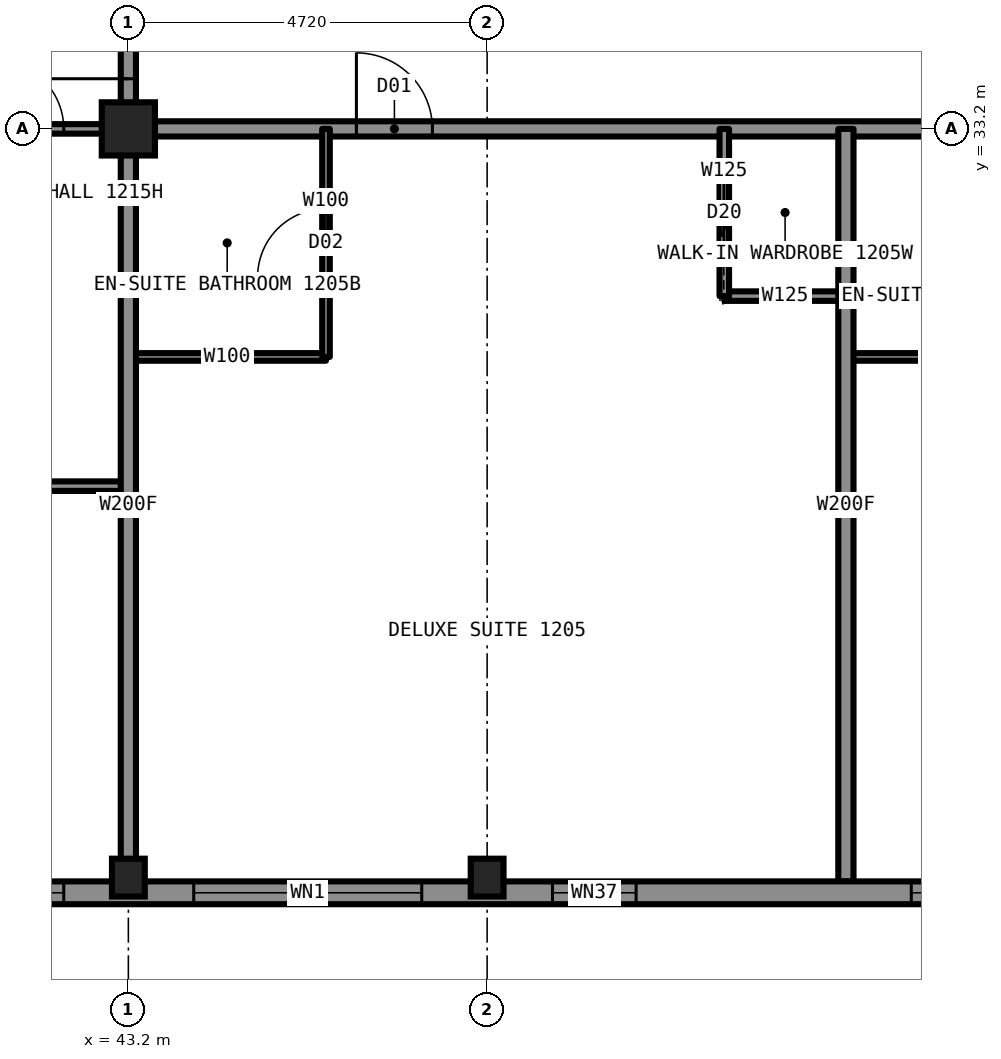
"""IFC4 building model, lengths in metres.
Left out: names, types, materials, properties, quantities, classifications, styles, units other than length and angle.
Written with IfcOpenShell. Run it as: python <this file> out.ifc"""

import sys

from ifc_helpers import new_model, si_unit, direction, frame, frame_2d, origin, origin_2d, place, context, subcontext, project, spatial, rectangle, hollow_rectangle, i_section, extrude, element, fill, save


model = new_model("IFC4")
c1 = context("Model", 3, precision=1e-05, world=origin(), true_north=direction((0.0, 1.0)))
c2 = subcontext(c1, "Body", "Model", "MODEL_VIEW")
j1 = project(units=[si_unit("LENGTHUNIT", "METRE"), si_unit("PLANEANGLEUNIT", "RADIAN")], contexts=[c1])
p1 = place(None, origin())
s1 = spatial("IfcSite", under=j1, at=p1, CompositionType="ELEMENT")
p2 = place(p1, origin())
s2 = spatial("IfcBuilding", under=s1, at=p2, CompositionType="ELEMENT")
p3 = place(p2, frame((0.0, 0.0, 49.5)))
s3 = spatial("IfcBuildingStorey", under=s2, at=p3, CompositionType="ELEMENT", Elevation=49.5)
for number, where, z_axis, x_axis in (
    (1, (43.2, 23.35, 0.0), (0.0, 0.0, 1.0), (1.0, 0.0, 0.0)),
    (2, (47.92, 23.35, 0.0), (0.0, 0.0, 1.0), (1.0, 0.0, 0.0)),
):
    element("IfcColumn", number, at=place(p3, frame(where, z_axis=z_axis, x_axis=x_axis)), inside=s3, PredefinedType="COLUMN", context=c2, shape_type="SweptSolid", body=[
        extrude(i_section(OverallWidth=0.432, OverallDepth=0.498, WebThickness=0.056, FlangeThickness=0.089, at=origin_2d()), origin(), (0.0, 0.0, 1.0), 3.5),
    ])
p4 = place(p3, frame((43.2, 33.2, 0.0), z_axis=(0.0, 0.0, 1.0), x_axis=(1.0, 0.0, 0.0)))
e3 = element("IfcColumn", 3, at=p4, inside=s3, PredefinedType="COLUMN", context=c2, shape_type="SweptSolid", body=[
    extrude(hollow_rectangle(XDim=0.7, YDim=0.7, WallThickness=0.06, at=origin_2d()), origin(), (0.0, 0.0, 1.0), 3.5),
])
p5 = place(p3, frame((43.2, 33.2, 0.0), z_axis=(0.0, 0.0, 1.0), x_axis=(1.0, 0.0, 0.0)))
e4 = element("IfcWall", 4, at=p5, inside=s3, PredefinedType="PARTITIONING", context=c2, shape_type="SweptSolid", body=[
    extrude(rectangle(XDim=23.6, YDim=0.2, at=frame_2d((11.8, 0.0))), origin(), (0.0, 0.0, 1.0), 3.33),
])
p6 = place(p5, frame((3.0, 0.0, 0.0)))
e5 = element("IfcOpeningElement", 5, at=p6, cuts=e4, PredefinedType="OPENING", context=c2, shape_type="SweptSolid", body=[
    extrude(rectangle(XDim=1.0, YDim=2.2, at=frame_2d((0.5, 1.1))), frame((0.0, 0.11, 0.0), z_axis=(0.0, -1.0, 0.0), x_axis=(1.0, 0.0, 0.0)), (0.0, 0.0, 1.0), 0.22),
])
p7 = place(p5, frame((12.44, 0.0, 0.0)))
e6 = element("IfcOpeningElement", 6, at=p7, cuts=e4, PredefinedType="OPENING", context=c2, shape_type="SweptSolid", body=[
    extrude(rectangle(XDim=1.0, YDim=2.2, at=frame_2d((0.5, 1.1))), frame((0.0, 0.11, 0.0), z_axis=(0.0, -1.0, 0.0), x_axis=(1.0, 0.0, 0.0)), (0.0, 0.0, 1.0), 0.22),
])
p8 = place(p5, frame((19.28, 0.0, 0.0)))
e7 = element("IfcOpeningElement", 7, at=p8, cuts=e4, PredefinedType="OPENING", context=c2, shape_type="SweptSolid", body=[
    extrude(rectangle(XDim=1.0, YDim=2.2, at=frame_2d((0.5, 1.1))), frame((0.0, 0.11, 0.0), z_axis=(0.0, -1.0, 0.0), x_axis=(1.0, 0.0, 0.0)), (0.0, 0.0, 1.0), 0.22),
])
p9 = place(p3, frame((33.3, 33.2, 0.0), z_axis=(0.0, 0.0, 1.0), x_axis=(1.0, 0.0, 0.0)))
e8 = element("IfcWall", 8, at=p9, inside=s3, PredefinedType="PARTITIONING", context=c2, shape_type="SweptSolid", body=[
    extrude(rectangle(XDim=9.9, YDim=0.125, at=frame_2d((4.95, 0.0))), origin(), (0.0, 0.0, 1.0), 2.573),
])
p10 = place(p9, frame((8.15, 0.0, 0.0)))
e9 = element("IfcOpeningElement", 9, at=p10, cuts=e8, PredefinedType="OPENING", context=c2, shape_type="SweptSolid", body=[
    extrude(rectangle(XDim=0.9, YDim=2.2, at=frame_2d((0.45, 1.1))), frame((0.0, 0.073, 0.0), z_axis=(0.0, -1.0, 0.0), x_axis=(1.0, 0.0, 0.0)), (0.0, 0.0, 1.0), 0.145),
])
p11 = place(p3, frame((51.04, 31.0, 0.0), z_axis=(0.0, 0.0, 1.0), x_axis=(1.0, 0.0, 0.0)))
e10 = element("IfcWall", 10, at=p11, inside=s3, PredefinedType="PARTITIONING", context=c2, shape_type="SweptSolid", body=[
    extrude(rectangle(XDim=1.6, YDim=0.125, at=frame_2d((0.8, 0.0))), origin(), (0.0, 0.0, 1.0), 3.33),
])
for number, where, z_axis, x_axis in (
    (11, (43.2, 30.2, 0.0), (0.0, 0.0, 1.0), (1.0, 0.0, 0.0)),
    (12, (52.64, 30.2, 0.0), (0.0, 0.0, 1.0), (1.0, 0.0, 0.0)),
):
    element("IfcWall", number, at=place(p3, frame(where, z_axis=z_axis, x_axis=x_axis)), inside=s3, PredefinedType="PARTITIONING", context=c2, shape_type="SweptSolid", body=[
        extrude(rectangle(XDim=2.6, YDim=0.1, at=frame_2d((1.3, 0.0))), origin(), (0.0, 0.0, 1.0), 3.33),
    ])
p12 = place(p3, frame((33.306, 28.5, 0.0), z_axis=(0.0, 0.0, 1.0), x_axis=(1.0, 0.0, 0.0)))
e13 = element("IfcWall", 13, at=p12, inside=s3, PredefinedType="PARTITIONING", context=c2, shape_type="SweptSolid", body=[
    extrude(rectangle(XDim=9.894, YDim=0.125, at=frame_2d((4.947, 0.0))), origin(), (0.0, 0.0, 1.0), 3.33),
])
p13 = place(p12, frame((7.244, 0.0, 0.0)))
e14 = element("IfcOpeningElement", 14, at=p13, cuts=e13, PredefinedType="OPENING", context=c2, shape_type="SweptSolid", body=[
    extrude(rectangle(XDim=0.9, YDim=2.2, at=frame_2d((0.45, 1.1))), frame((0.0, 0.073, 0.0), z_axis=(0.0, -1.0, 0.0), x_axis=(1.0, 0.0, 0.0)), (0.0, 0.0, 1.0), 0.145),
])
p14 = place(p3, frame((43.2, 33.2, 0.0), z_axis=(0.0, 0.0, 1.0), x_axis=(0.0, 1.0, 0.0)))
e15 = element("IfcWall", 15, at=p14, inside=s3, PredefinedType="PARTITIONING", context=c2, shape_type="SweptSolid", body=[
    extrude(rectangle(XDim=4.72, YDim=0.2, at=frame_2d((2.36, 0.0))), origin(), (0.0, 0.0, 1.0), 3.33),
])
p15 = place(p14, frame((0.66, 0.0, 0.0)))
e16 = element("IfcOpeningElement", 16, at=p15, cuts=e15, PredefinedType="OPENING", context=c2, shape_type="SweptSolid", body=[
    extrude(rectangle(XDim=1.1, YDim=2.2, at=frame_2d((0.55, 1.1))), frame((0.0, 0.11, 0.0), z_axis=(0.0, -1.0, 0.0), x_axis=(1.0, 0.0, 0.0)), (0.0, 0.0, 1.0), 0.22),
])
p16 = place(p3, frame((43.2, 23.3, 0.0), z_axis=(0.0, 0.0, 1.0), x_axis=(0.0, 1.0, 0.0)))
e17 = element("IfcWall", 17, at=p16, inside=s3, PredefinedType="PARTITIONING", context=c2, shape_type="SweptSolid", body=[
    extrude(rectangle(XDim=9.9, YDim=0.2, at=frame_2d((4.95, 0.0))), origin(), (0.0, 0.0, 1.0), 2.573),
])
p17 = place(p3, frame((52.64, 23.3, 0.0), z_axis=(0.0, 0.0, 1.0), x_axis=(0.0, 1.0, 0.0)))
e18 = element("IfcWall", 18, at=p17, inside=s3, PredefinedType="PARTITIONING", context=c2, shape_type="SweptSolid", body=[
    extrude(rectangle(XDim=9.9, YDim=0.2, at=frame_2d((4.95, 0.0))), origin(), (0.0, 0.0, 1.0), 3.33),
])
p18 = place(p3, frame((51.04, 31.0, 0.0), z_axis=(0.0, 0.0, 1.0), x_axis=(0.0, 1.0, 0.0)))
e19 = element("IfcWall", 19, at=p18, inside=s3, PredefinedType="PARTITIONING", context=c2, shape_type="SweptSolid", body=[
    extrude(rectangle(XDim=2.2, YDim=0.125, at=frame_2d((1.1, 0.0))), origin(), (0.0, 0.0, 1.0), 3.33),
])
p19 = place(p18, frame((0.7, 0.0, 0.0)))
e20 = element("IfcOpeningElement", 20, at=p19, cuts=e19, PredefinedType="OPENING", context=c2, shape_type="SweptSolid", body=[
    extrude(rectangle(XDim=0.8, YDim=2.1, at=frame_2d((0.4, 1.05))), frame((0.0, 0.073, 0.0), z_axis=(0.0, -1.0, 0.0), x_axis=(1.0, 0.0, 0.0)), (0.0, 0.0, 1.0), 0.145),
])
p20 = place(p3, frame((45.8, 30.2, 0.0), z_axis=(0.0, 0.0, 1.0), x_axis=(0.0, 1.0, 0.0)))
e21 = element("IfcWall", 21, at=p20, inside=s3, PredefinedType="PARTITIONING", context=c2, shape_type="SweptSolid", body=[
    extrude(rectangle(XDim=3.0, YDim=0.1, at=frame_2d((1.5, 0.0))), origin(), (0.0, 0.0, 1.0), 3.33),
])
p21 = place(p20, frame((1.05, 0.0, 0.0)))
e22 = element("IfcOpeningElement", 22, at=p21, cuts=e21, PredefinedType="OPENING", context=c2, shape_type="SweptSolid", body=[
    extrude(rectangle(XDim=0.9, YDim=2.1, at=frame_2d((0.45, 1.05))), frame((0.0, 0.06, 0.0), z_axis=(0.0, -1.0, 0.0), x_axis=(1.0, 0.0, 0.0)), (0.0, 0.0, 1.0), 0.12),
])
p22 = place(p3, frame((38.5, 23.15, 0.0), z_axis=(0.0, 0.0, 1.0), x_axis=(1.0, 0.0, 0.0)))
e23 = element("IfcWall", 23, at=p22, inside=s3, PredefinedType="SOLIDWALL", context=c2, shape_type="SweptSolid", body=[
    extrude(rectangle(XDim=33.0, YDim=0.3, at=frame_2d((16.5, 0.0))), origin(), (0.0, 0.0, 1.0), 2.83),
])
p23 = place(p22, frame((0.85, 0.0, 0.5)))
e24 = element("IfcOpeningElement", 24, at=p23, cuts=e23, PredefinedType="OPENING", context=c2, shape_type="SweptSolid", body=[
    extrude(rectangle(XDim=3.0, YDim=2.0, at=frame_2d((1.5, 1.0))), frame((0.0, 0.16, 0.0), z_axis=(0.0, -1.0, 0.0), x_axis=(1.0, 0.0, 0.0)), (0.0, 0.0, 1.0), 0.32),
])
p24 = place(p22, frame((5.56, 0.0, 0.5)))
e25 = element("IfcOpeningElement", 25, at=p24, cuts=e23, PredefinedType="OPENING", context=c2, shape_type="SweptSolid", body=[
    extrude(rectangle(XDim=3.0, YDim=2.0, at=frame_2d((1.5, 1.0))), frame((0.0, 0.16, 0.0), z_axis=(0.0, -1.0, 0.0), x_axis=(1.0, 0.0, 0.0)), (0.0, 0.0, 1.0), 0.32),
])
p25 = place(p22, frame((10.28, 0.0, 1.1)))
e26 = element("IfcOpeningElement", 26, at=p25, cuts=e23, PredefinedType="OPENING", context=c2, shape_type="SweptSolid", body=[
    extrude(rectangle(XDim=1.1, YDim=1.4, at=frame_2d((0.55, 0.7))), frame((0.0, 0.16, 0.0), z_axis=(0.0, -1.0, 0.0), x_axis=(1.0, 0.0, 0.0)), (0.0, 0.0, 1.0), 0.32),
])
p26 = place(p22, frame((15.0, 0.0, 0.5)))
e27 = element("IfcOpeningElement", 27, at=p26, cuts=e23, PredefinedType="OPENING", context=c2, shape_type="SweptSolid", body=[
    extrude(rectangle(XDim=3.0, YDim=2.0, at=frame_2d((1.5, 1.0))), frame((0.0, 0.16, 0.0), z_axis=(0.0, -1.0, 0.0), x_axis=(1.0, 0.0, 0.0)), (0.0, 0.0, 1.0), 0.32),
])
p27 = place(p22, frame((21.62, 0.0, 1.1)))
e28 = element("IfcOpeningElement", 28, at=p27, cuts=e23, PredefinedType="OPENING", context=c2, shape_type="SweptSolid", body=[
    extrude(rectangle(XDim=1.1, YDim=1.4, at=frame_2d((0.55, 0.7))), frame((0.0, 0.16, 0.0), z_axis=(0.0, -1.0, 0.0), x_axis=(1.0, 0.0, 0.0)), (0.0, 0.0, 1.0), 0.32),
])
p28 = place(p22, frame((24.44, 0.0, 0.5)))
e29 = element("IfcOpeningElement", 29, at=p28, cuts=e23, PredefinedType="OPENING", context=c2, shape_type="SweptSolid", body=[
    extrude(rectangle(XDim=3.0, YDim=2.0, at=frame_2d((1.5, 1.0))), frame((0.0, 0.16, 0.0), z_axis=(0.0, -1.0, 0.0), x_axis=(1.0, 0.0, 0.0)), (0.0, 0.0, 1.0), 0.32),
])
p29 = place(p22, frame((29.15, 0.0, 0.5)))
e30 = element("IfcOpeningElement", 30, at=p29, cuts=e23, PredefinedType="OPENING", context=c2, shape_type="SweptSolid", body=[
    extrude(rectangle(XDim=3.0, YDim=2.0, at=frame_2d((1.5, 1.0))), frame((0.0, 0.16, 0.0), z_axis=(0.0, -1.0, 0.0), x_axis=(1.0, 0.0, 0.0)), (0.0, 0.0, 1.0), 0.32),
])
p30 = place(p6, origin())
e31 = element("IfcDoor", 31, at=p30, inside=s3, OperationType="SINGLE_SWING_LEFT", PredefinedType="DOOR", context=c2, shape_type="SweptSolid", body=[
    extrude(rectangle(XDim=1.0, YDim=2.2, at=frame_2d((0.5, 1.1))), frame((0.0, 0.025, 0.0), z_axis=(0.0, -1.0, 0.0), x_axis=(1.0, 0.0, 0.0)), (0.0, 0.0, 1.0), 0.05),
])
fill(e5, e31)
p31 = place(p21, origin())
e32 = element("IfcDoor", 32, at=p31, inside=s3, OperationType="SINGLE_SWING_RIGHT", PredefinedType="DOOR", context=c2, shape_type="SweptSolid", body=[
    extrude(rectangle(XDim=0.9, YDim=2.1, at=frame_2d((0.45, 1.05))), frame((0.0, 0.025, 0.0), z_axis=(0.0, -1.0, 0.0), x_axis=(1.0, 0.0, 0.0)), (0.0, 0.0, 1.0), 0.05),
])
fill(e22, e32)
p32 = place(p19, origin())
e33 = element("IfcDoor", 33, at=p32, inside=s3, OperationType="SLIDING_TO_LEFT", PredefinedType="DOOR", context=c2, shape_type="SweptSolid", body=[
    extrude(rectangle(XDim=0.8, YDim=2.1, at=frame_2d((0.4, 1.05))), frame((0.0, 0.025, 0.0), z_axis=(0.0, -1.0, 0.0), x_axis=(1.0, 0.0, 0.0)), (0.0, 0.0, 1.0), 0.05),
])
fill(e20, e33)
p33 = place(p10, origin())
e34 = element("IfcDoor", 34, at=p33, inside=s3, OperationType="SINGLE_SWING_LEFT", PredefinedType="DOOR", context=c2, shape_type="SweptSolid", body=[
    extrude(rectangle(XDim=0.9, YDim=2.2, at=frame_2d((0.45, 1.1))), frame((0.0, 0.025, 0.0), z_axis=(0.0, -1.0, 0.0), x_axis=(1.0, 0.0, 0.0)), (0.0, 0.0, 1.0), 0.05),
])
fill(e9, e34)
p34 = place(p15, origin())
e35 = element("IfcDoor", 35, at=p34, inside=s3, OperationType="SINGLE_SWING_LEFT", PredefinedType="DOOR", context=c2, shape_type="SweptSolid", body=[
    extrude(rectangle(XDim=1.1, YDim=2.2, at=frame_2d((0.55, 1.1))), frame((0.0, 0.025, 0.0), z_axis=(0.0, -1.0, 0.0), x_axis=(1.0, 0.0, 0.0)), (0.0, 0.0, 1.0), 0.05),
])
fill(e16, e35)
p35 = place(p23, origin())
e36 = element("IfcWindow", 36, at=p35, inside=s3, PartitioningType="SINGLE_PANEL", PredefinedType="WINDOW", context=c2, shape_type="SweptSolid", body=[
    extrude(rectangle(XDim=3.0, YDim=2.0, at=frame_2d((1.5, 1.0))), frame((0.0, 0.03, 0.0), z_axis=(0.0, -1.0, 0.0), x_axis=(1.0, 0.0, 0.0)), (0.0, 0.0, 1.0), 0.06),
])
fill(e24, e36)
p36 = place(p24, origin())
e37 = element("IfcWindow", 37, at=p36, inside=s3, PartitioningType="SINGLE_PANEL", PredefinedType="WINDOW", context=c2, shape_type="SweptSolid", body=[
    extrude(rectangle(XDim=3.0, YDim=2.0, at=frame_2d((1.5, 1.0))), frame((0.0, 0.03, 0.0), z_axis=(0.0, -1.0, 0.0), x_axis=(1.0, 0.0, 0.0)), (0.0, 0.0, 1.0), 0.06),
])
fill(e25, e37)
p37 = place(p25, origin())
e38 = element("IfcWindow", 38, at=p37, inside=s3, PartitioningType="SINGLE_PANEL", PredefinedType="WINDOW", context=c2, shape_type="SweptSolid", body=[
    extrude(rectangle(XDim=1.1, YDim=1.4, at=frame_2d((0.55, 0.7))), frame((0.0, 0.03, 0.0), z_axis=(0.0, -1.0, 0.0), x_axis=(1.0, 0.0, 0.0)), (0.0, 0.0, 1.0), 0.06),
])
fill(e26, e38)
p38 = place(p26, origin())
e39 = element("IfcWindow", 39, at=p38, inside=s3, PartitioningType="SINGLE_PANEL", PredefinedType="WINDOW", context=c2, shape_type="SweptSolid", body=[
    extrude(rectangle(XDim=3.0, YDim=2.0, at=frame_2d((1.5, 1.0))), frame((0.0, 0.03, 0.0), z_axis=(0.0, -1.0, 0.0), x_axis=(1.0, 0.0, 0.0)), (0.0, 0.0, 1.0), 0.06),
])
fill(e27, e39)
save(model, sys.argv[1])
